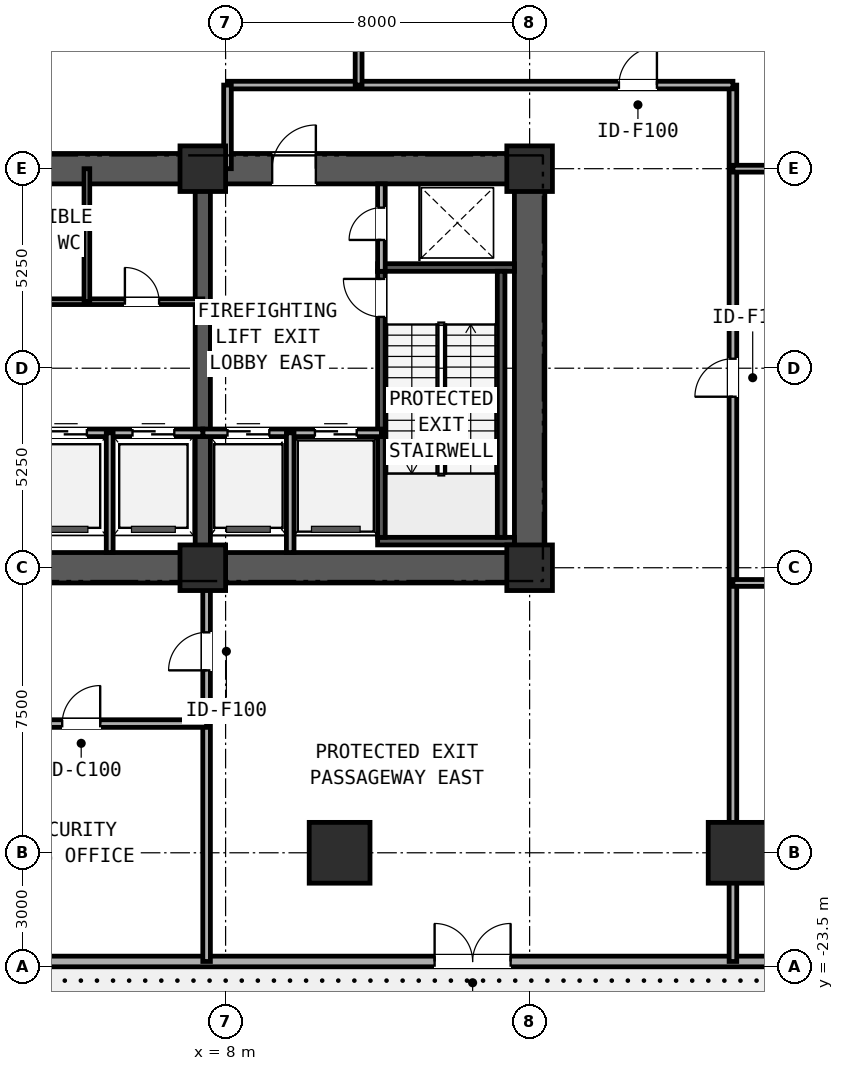
"""IFC4 building model, lengths in metres.
Left out: names, types, materials, properties, quantities, classifications, styles, units other than length and angle.
Written with IfcOpenShell. Run it as: python <this file> out.ifc"""

import sys

from ifc_helpers import new_model, si_unit, direction, frame, frame_2d, origin, origin_2d, place, context, subcontext, project, spatial, rectangle, extrude, element, fill, save


model = new_model("IFC4")
c1 = context("Model", 3, precision=1e-05, world=origin(), true_north=direction((0.0, 1.0)))
c2 = subcontext(c1, "Body", "Model", "MODEL_VIEW")
j1 = project(units=[si_unit("LENGTHUNIT", "METRE"), si_unit("PLANEANGLEUNIT", "RADIAN")], contexts=[c1])
p1 = place(None, origin())
s1 = spatial("IfcSite", under=j1, at=p1, CompositionType="ELEMENT")
p2 = place(p1, origin())
s2 = spatial("IfcBuilding", under=s1, at=p2, CompositionType="ELEMENT")
p3 = place(p2, origin())
s3 = spatial("IfcBuildingStorey", under=s2, at=p3, CompositionType="ELEMENT", Elevation=0.0)
p4 = place(p3, frame((-16.4, -13.0, 0.0), z_axis=(0.0, 0.0, 1.0), x_axis=(1.0, 0.0, 0.0)))
e1 = element("IfcWall", 1, at=p4, inside=s3, PredefinedType="SHEAR", context=c2, shape_type="SweptSolid", body=[
    extrude(rectangle(XDim=32.8, YDim=0.8, at=frame_2d((16.4, 0.0))), origin(), (0.0, 0.0, 1.0), 4.82),
])
p5 = place(p3, frame((-16.4, -2.5, 0.0), z_axis=(0.0, 0.0, 1.0), x_axis=(1.0, 0.0, 0.0)))
e2 = element("IfcWall", 2, at=p5, inside=s3, PredefinedType="SHEAR", context=c2, shape_type="SweptSolid", body=[
    extrude(rectangle(XDim=32.8, YDim=0.8, at=frame_2d((16.4, 0.0))), origin(), (0.0, 0.0, 1.0), 4.82),
])
p6 = place(p5, frame((6.025, 0.0, 0.0)))
e3 = element("IfcOpeningElement", 3, at=p6, cuts=e2, PredefinedType="OPENING", context=c2, shape_type="SweptSolid", body=[
    extrude(rectangle(XDim=1.15, YDim=2.0, at=frame_2d((0.575, 1.0))), frame((0.0, 0.41, 0.0), z_axis=(0.0, -1.0, 0.0), x_axis=(1.0, 0.0, 0.0)), (0.0, 0.0, 1.0), 0.82),
])
p7 = place(p5, frame((15.6, 0.0, 0.0)))
e4 = element("IfcOpeningElement", 4, at=p7, cuts=e2, PredefinedType="OPENING", context=c2, shape_type="SweptSolid", body=[
    extrude(rectangle(XDim=1.6, YDim=2.0, at=frame_2d((0.8, 1.0))), frame((0.0, 0.41, 0.0), z_axis=(0.0, -1.0, 0.0), x_axis=(1.0, 0.0, 0.0)), (0.0, 0.0, 1.0), 0.82),
])
p8 = place(p5, frame((25.625, 0.0, 0.0)))
e5 = element("IfcOpeningElement", 5, at=p8, cuts=e2, PredefinedType="OPENING", context=c2, shape_type="SweptSolid", body=[
    extrude(rectangle(XDim=1.15, YDim=2.0, at=frame_2d((0.575, 1.0))), frame((0.0, 0.41, 0.0), z_axis=(0.0, -1.0, 0.0), x_axis=(1.0, 0.0, 0.0)), (0.0, 0.0, 1.0), 0.82),
])
p9 = place(p3, frame((16.0, -12.6, 0.0), z_axis=(0.0, 0.0, 1.0), x_axis=(0.0, 1.0, 0.0)))
e6 = element("IfcWall", 6, at=p9, inside=s3, PredefinedType="SHEAR", context=c2, shape_type="SweptSolid", body=[
    extrude(rectangle(XDim=9.7, YDim=0.8, at=frame_2d((4.85, 0.0))), origin(), (0.0, 0.0, 1.0), 4.82),
])
p10 = place(p3, frame((7.4, -12.6, 0.0), z_axis=(0.0, 0.0, 1.0), x_axis=(0.0, 1.0, 0.0)))
e7 = element("IfcWall", 7, at=p10, inside=s3, PredefinedType="SHEAR", context=c2, shape_type="SweptSolid", body=[
    extrude(rectangle(XDim=9.7, YDim=0.4, at=frame_2d((4.85, 0.0))), origin(), (0.0, 0.0, 1.0), 5.1),
])
for number, where, z_axis, x_axis in (
    (8, (12.0, -12.3, 0.0), (0.0, 0.0, 1.0), (1.0, 0.0, 0.0)),
    (9, (12.0, -5.1, 0.0), (0.0, 0.0, 1.0), (1.0, 0.0, 0.0)),
):
    element("IfcWall", number, at=place(p3, frame(where, z_axis=z_axis, x_axis=x_axis)), inside=s3, PredefinedType="SOLIDWALL", context=c2, shape_type="SweptSolid", body=[
        extrude(rectangle(XDim=3.6, YDim=0.2, at=frame_2d((1.8, 0.0))), origin(), (0.0, 0.0, 1.0), 5.1),
    ])
p11 = place(p3, frame((12.1, -12.2, 0.0), z_axis=(0.0, 0.0, 1.0), x_axis=(0.0, 1.0, 0.0)))
e10 = element("IfcWall", 10, at=p11, inside=s3, PredefinedType="SOLIDWALL", context=c2, shape_type="SweptSolid", body=[
    extrude(rectangle(XDim=7.0, YDim=0.2, at=frame_2d((3.5, 0.0))), origin(), (0.0, 0.0, 1.0), 5.1),
])
p12 = place(p11, frame((5.8, 0.0, 0.0)))
e11 = element("IfcOpeningElement", 11, at=p12, cuts=e10, PredefinedType="OPENING", context=c2, shape_type="SweptSolid", body=[
    extrude(rectangle(XDim=1.0, YDim=2.1, at=frame_2d((0.5, 1.05))), frame((0.0, 0.11, 0.0), z_axis=(0.0, -1.0, 0.0), x_axis=(1.0, 0.0, 0.0)), (0.0, 0.0, 1.0), 0.22),
])
p13 = place(p3, frame((15.25, -12.2, 0.0), z_axis=(0.0, 0.0, 1.0), x_axis=(0.0, 1.0, 0.0)))
e12 = element("IfcWall", 12, at=p13, inside=s3, PredefinedType="SOLIDWALL", context=c2, shape_type="SweptSolid", body=[
    extrude(rectangle(XDim=7.0, YDim=0.2, at=frame_2d((3.5, 0.0))), origin(), (0.0, 0.0, 1.0), 5.1),
])
for number, where, z_axis, x_axis in (
    (13, (7.4, -13.0, 0.0), (0.0, 0.0, 1.0), (1.0, 0.0, 0.0)),
    (14, (16.0, -13.0, 0.0), (0.0, 0.0, 1.0), (1.0, 0.0, 0.0)),
    (15, (7.4, -2.5, 0.0), (0.0, 0.0, 1.0), (1.0, 0.0, 0.0)),
    (16, (16.0, -2.5, 0.0), (0.0, 0.0, 1.0), (1.0, 0.0, 0.0)),
):
    element("IfcColumn", number, at=place(p3, frame(where, z_axis=z_axis, x_axis=x_axis)), inside=s3, PredefinedType="COLUMN", context=c2, shape_type="SweptSolid", body=[
        extrude(rectangle(XDim=1.2, YDim=1.2, at=origin_2d()), origin(), (0.0, 0.0, 1.0), 5.4),
    ])
for number, where, z_axis, x_axis in (
    (17, (11.0, -20.5, 0.0), (0.0, 0.0, 1.0), (1.0, 0.0, 0.0)),
    (18, (21.5, -20.5, 0.0), (0.0, 0.0, 1.0), (1.0, 0.0, 0.0)),
):
    element("IfcColumn", number, at=place(p3, frame(where, z_axis=z_axis, x_axis=x_axis)), inside=s3, PredefinedType="COLUMN", context=c2, shape_type="SweptSolid", body=[
        extrude(rectangle(XDim=1.6, YDim=1.6, at=origin_2d()), origin(), (0.0, 0.0, 1.0), 5.4),
    ])
p14 = place(p3, frame((-32.4, -23.36, 0.0), z_axis=(0.0, 0.0, 1.0), x_axis=(1.0, 0.0, 0.0)))
e19 = element("IfcWall", 19, at=p14, inside=s3, PredefinedType="STANDARD", context=c2, shape_type="SweptSolid", body=[
    extrude(rectangle(XDim=64.8, YDim=0.28, at=frame_2d((32.4, 0.0))), origin(), (0.0, 0.0, 1.0), 5.1),
])
p15 = place(p14, frame((16.9, 0.0, 0.0)))
e20 = element("IfcOpeningElement", 20, at=p15, cuts=e19, PredefinedType="OPENING", context=c2, shape_type="SweptSolid", body=[
    extrude(rectangle(XDim=2.0, YDim=2.35, at=frame_2d((1.0, 1.175))), frame((0.0, 0.15, 0.0), z_axis=(0.0, -1.0, 0.0), x_axis=(1.0, 0.0, 0.0)), (0.0, 0.0, 1.0), 0.3),
])
p16 = place(p14, frame((45.9, 0.0, 0.0)))
e21 = element("IfcOpeningElement", 21, at=p16, cuts=e19, PredefinedType="OPENING", context=c2, shape_type="SweptSolid", body=[
    extrude(rectangle(XDim=2.0, YDim=2.35, at=frame_2d((1.0, 1.175))), frame((0.0, 0.15, 0.0), z_axis=(0.0, -1.0, 0.0), x_axis=(1.0, 0.0, 0.0)), (0.0, 0.0, 1.0), 0.3),
])
p17 = place(p3, frame((12.1, -5.2, 0.0), z_axis=(0.0, 0.0, 1.0), x_axis=(0.0, 1.0, 0.0)))
e22 = element("IfcWall", 22, at=p17, inside=s3, PredefinedType="PARTITIONING", context=c2, shape_type="SweptSolid", body=[
    extrude(rectangle(XDim=2.3, YDim=0.2, at=frame_2d((1.15, 0.0))), origin(), (0.0, 0.0, 1.0), 5.1),
])
p18 = place(p17, frame((0.825, 0.0, 0.0)))
e23 = element("IfcOpeningElement", 23, at=p18, cuts=e22, PredefinedType="OPENING", context=c2, shape_type="SweptSolid", body=[
    extrude(rectangle(XDim=0.85, YDim=2.05, at=frame_2d((0.425, 1.025))), frame((0.0, 0.11, 0.0), z_axis=(0.0, -1.0, 0.0), x_axis=(1.0, 0.0, 0.0)), (0.0, 0.0, 1.0), 0.22),
])
p19 = place(p3, frame((7.4, -9.45, 0.0), z_axis=(0.0, 0.0, 1.0), x_axis=(1.0, 0.0, 0.0)))
e24 = element("IfcWall", 24, at=p19, inside=s3, PredefinedType="PARTITIONING", context=c2, shape_type="SweptSolid", body=[
    extrude(rectangle(XDim=4.7, YDim=0.2, at=frame_2d((2.35, 0.0))), origin(), (0.0, 0.0, 1.0), 5.1),
])
p20 = place(p19, frame((2.95, 0.0, 0.0)))
e25 = element("IfcOpeningElement", 25, at=p20, cuts=e24, PredefinedType="OPENING", context=c2, shape_type="SweptSolid", body=[
    extrude(rectangle(XDim=1.1, YDim=2.2, at=frame_2d((0.55, 1.1))), frame((0.0, 0.11, 0.0), z_axis=(0.0, -1.0, 0.0), x_axis=(1.0, 0.0, 0.0)), (0.0, 0.0, 1.0), 0.22),
])
p21 = place(p19, frame((0.65, 0.0, 0.0)))
e26 = element("IfcOpeningElement", 26, at=p21, cuts=e24, PredefinedType="OPENING", context=c2, shape_type="SweptSolid", body=[
    extrude(rectangle(XDim=1.1, YDim=2.2, at=frame_2d((0.55, 1.1))), frame((0.0, 0.11, 0.0), z_axis=(0.0, -1.0, 0.0), x_axis=(1.0, 0.0, 0.0)), (0.0, 0.0, 1.0), 0.22),
])
p22 = place(p3, frame((9.7, -12.6, 0.0), z_axis=(0.0, 0.0, 1.0), x_axis=(0.0, 1.0, 0.0)))
e27 = element("IfcWall", 27, at=p22, inside=s3, PredefinedType="PARTITIONING", context=c2, shape_type="SweptSolid", body=[
    extrude(rectangle(XDim=3.15, YDim=0.2, at=frame_2d((1.575, 0.0))), origin(), (0.0, 0.0, 1.0), 5.1),
])
p23 = place(p3, frame((2.55, -9.45, 0.0), z_axis=(0.0, 0.0, 1.0), x_axis=(1.0, 0.0, 0.0)))
e28 = element("IfcWall", 28, at=p23, inside=s3, PredefinedType="PARTITIONING", context=c2, shape_type="SweptSolid", body=[
    extrude(rectangle(XDim=4.85, YDim=0.2, at=frame_2d((2.425, 0.0))), origin(), (0.0, 0.0, 1.0), 5.1),
])
p24 = place(p23, frame((0.7, 0.0, 0.0)))
e29 = element("IfcOpeningElement", 29, at=p24, cuts=e28, PredefinedType="OPENING", context=c2, shape_type="SweptSolid", body=[
    extrude(rectangle(XDim=1.1, YDim=2.2, at=frame_2d((0.55, 1.1))), frame((0.0, 0.11, 0.0), z_axis=(0.0, -1.0, 0.0), x_axis=(1.0, 0.0, 0.0)), (0.0, 0.0, 1.0), 0.22),
])
p25 = place(p23, frame((3.0, 0.0, 0.0)))
e30 = element("IfcOpeningElement", 30, at=p25, cuts=e28, PredefinedType="OPENING", context=c2, shape_type="SweptSolid", body=[
    extrude(rectangle(XDim=1.1, YDim=2.2, at=frame_2d((0.55, 1.1))), frame((0.0, 0.11, 0.0), z_axis=(0.0, -1.0, 0.0), x_axis=(1.0, 0.0, 0.0)), (0.0, 0.0, 1.0), 0.22),
])
p26 = place(p3, frame((4.95, -12.6, 0.0), z_axis=(0.0, 0.0, 1.0), x_axis=(0.0, 1.0, 0.0)))
e31 = element("IfcWall", 31, at=p26, inside=s3, PredefinedType="PARTITIONING", context=c2, shape_type="SweptSolid", body=[
    extrude(rectangle(XDim=3.15, YDim=0.18, at=frame_2d((1.575, 0.0))), origin(), (0.0, 0.0, 1.0), 5.1),
])
p27 = place(p3, frame((1.6, -6.0, 0.0), z_axis=(0.0, 0.0, 1.0), x_axis=(1.0, 0.0, 0.0)))
e32 = element("IfcWall", 32, at=p27, inside=s3, PredefinedType="PARTITIONING", context=c2, shape_type="SweptSolid", body=[
    extrude(rectangle(XDim=5.8, YDim=0.15, at=frame_2d((2.9, 0.0))), origin(), (0.0, 0.0, 1.0), 5.1),
])
p28 = place(p27, frame((0.9, 0.0, 0.0)))
e33 = element("IfcOpeningElement", 33, at=p28, cuts=e32, PredefinedType="OPENING", context=c2, shape_type="SweptSolid", body=[
    extrude(rectangle(XDim=0.9, YDim=2.1, at=frame_2d((0.45, 1.05))), frame((0.0, 0.085, 0.0), z_axis=(0.0, -1.0, 0.0), x_axis=(1.0, 0.0, 0.0)), (0.0, 0.0, 1.0), 0.17),
])
p29 = place(p27, frame((3.75, 0.0, 0.0)))
e34 = element("IfcOpeningElement", 34, at=p29, cuts=e32, PredefinedType="OPENING", context=c2, shape_type="SweptSolid", body=[
    extrude(rectangle(XDim=0.9, YDim=2.1, at=frame_2d((0.45, 1.05))), frame((0.0, 0.085, 0.0), z_axis=(0.0, -1.0, 0.0), x_axis=(1.0, 0.0, 0.0)), (0.0, 0.0, 1.0), 0.17),
])
p30 = place(p3, frame((4.35, -6.0, 0.0), z_axis=(0.0, 0.0, 1.0), x_axis=(0.0, 1.0, 0.0)))
e35 = element("IfcWall", 35, at=p30, inside=s3, PredefinedType="PARTITIONING", context=c2, shape_type="SweptSolid", body=[
    extrude(rectangle(XDim=3.5, YDim=0.15, at=frame_2d((1.75, 0.0))), origin(), (0.0, 0.0, 1.0), 4.229),
])
p31 = place(p3, frame((21.35, -23.36, 0.0), z_axis=(0.0, 0.0, 1.0), x_axis=(0.0, 1.0, 0.0)))
e36 = element("IfcWall", 36, at=p31, inside=s3, PredefinedType="PARTITIONING", context=c2, shape_type="SweptSolid", body=[
    extrude(rectangle(XDim=23.06, YDim=0.2, at=frame_2d((11.53, 0.0))), origin(), (0.0, 0.0, 1.0), 4.229),
])
p32 = place(p31, frame((14.86, 0.0, 0.0)))
e37 = element("IfcOpeningElement", 37, at=p32, cuts=e36, PredefinedType="OPENING", context=c2, shape_type="SweptSolid", body=[
    extrude(rectangle(XDim=1.0, YDim=2.1, at=frame_2d((0.5, 1.05))), frame((0.0, 0.11, 0.0), z_axis=(0.0, -1.0, 0.0), x_axis=(1.0, 0.0, 0.0)), (0.0, 0.0, 1.0), 0.22),
])
p33 = place(p3, frame((8.05, -0.3, 0.0), z_axis=(0.0, 0.0, 1.0), x_axis=(1.0, 0.0, 0.0)))
e38 = element("IfcWall", 38, at=p33, inside=s3, PredefinedType="PARTITIONING", context=c2, shape_type="SweptSolid", body=[
    extrude(rectangle(XDim=13.3, YDim=0.2, at=frame_2d((6.65, 0.0))), origin(), (0.0, 0.0, 1.0), 4.229),
])
p34 = place(p33, frame((10.3, 0.0, 0.0)))
e39 = element("IfcOpeningElement", 39, at=p34, cuts=e38, PredefinedType="OPENING", context=c2, shape_type="SweptSolid", body=[
    extrude(rectangle(XDim=1.0, YDim=2.1, at=frame_2d((0.5, 1.05))), frame((0.0, 0.11, 0.0), z_axis=(0.0, -1.0, 0.0), x_axis=(1.0, 0.0, 0.0)), (0.0, 0.0, 1.0), 0.22),
])
p35 = place(p3, frame((8.05, -2.5, 0.0), z_axis=(0.0, 0.0, 1.0), x_axis=(0.0, 1.0, 0.0)))
e40 = element("IfcWall", 40, at=p35, inside=s3, PredefinedType="PARTITIONING", context=c2, shape_type="SweptSolid", body=[
    extrude(rectangle(XDim=2.2, YDim=0.2, at=frame_2d((1.1, 0.0))), origin(), (0.0, 0.0, 1.0), 4.312),
])
p36 = place(p3, frame((7.5, -23.36, 0.0), z_axis=(0.0, 0.0, 1.0), x_axis=(0.0, 1.0, 0.0)))
e41 = element("IfcWall", 41, at=p36, inside=s3, PredefinedType="PARTITIONING", context=c2, shape_type="SweptSolid", body=[
    extrude(rectangle(XDim=10.01, YDim=0.2, at=frame_2d((5.005, 0.0))), origin(), (0.0, 0.0, 1.0), 4.229),
])
p37 = place(p36, frame((7.66, 0.0, 0.0)))
e42 = element("IfcOpeningElement", 42, at=p37, cuts=e41, PredefinedType="OPENING", context=c2, shape_type="SweptSolid", body=[
    extrude(rectangle(XDim=1.0, YDim=2.1, at=frame_2d((0.5, 1.05))), frame((0.0, 0.11, 0.0), z_axis=(0.0, -1.0, 0.0), x_axis=(1.0, 0.0, 0.0)), (0.0, 0.0, 1.0), 0.22),
])
p38 = place(p3, frame((-7.5, -17.1, 0.0), z_axis=(0.0, 0.0, 1.0), x_axis=(1.0, 0.0, 0.0)))
e43 = element("IfcWall", 43, at=p38, inside=s3, PredefinedType="PARTITIONING", context=c2, shape_type="SweptSolid", body=[
    extrude(rectangle(XDim=15.0, YDim=0.2, at=frame_2d((7.5, 0.0))), origin(), (0.0, 0.0, 1.0), 4.229),
])
p39 = place(p38, frame((2.8, 0.0, 0.0)))
e44 = element("IfcOpeningElement", 44, at=p39, cuts=e43, PredefinedType="OPENING", context=c2, shape_type="SweptSolid", body=[
    extrude(rectangle(XDim=1.0, YDim=2.1, at=frame_2d((0.5, 1.05))), frame((0.0, 0.11, 0.0), z_axis=(0.0, -1.0, 0.0), x_axis=(1.0, 0.0, 0.0)), (0.0, 0.0, 1.0), 0.22),
])
p40 = place(p38, frame((11.2, 0.0, 0.0)))
e45 = element("IfcOpeningElement", 45, at=p40, cuts=e43, PredefinedType="OPENING", context=c2, shape_type="SweptSolid", body=[
    extrude(rectangle(XDim=1.0, YDim=2.15, at=frame_2d((0.5, 1.075))), frame((0.0, 0.11, 0.0), z_axis=(0.0, -1.0, 0.0), x_axis=(1.0, 0.0, 0.0)), (0.0, 0.0, 1.0), 0.22),
])
p41 = place(p3, frame((11.5, -0.3, 0.0), z_axis=(0.0, 0.0, 1.0), x_axis=(0.0, 1.0, 0.0)))
e46 = element("IfcWall", 46, at=p41, inside=s3, PredefinedType="PARTITIONING", context=c2, shape_type="SweptSolid", body=[
    extrude(rectangle(XDim=17.5, YDim=0.18, at=frame_2d((8.75, 0.0))), origin(), (0.0, 0.0, 1.0), 4.229),
])
p42 = place(p41, frame((3.5, 0.0, 0.0)))
e47 = element("IfcOpeningElement", 47, at=p42, cuts=e46, PredefinedType="OPENING", context=c2, shape_type="SweptSolid", body=[
    extrude(rectangle(XDim=1.6, YDim=2.2, at=frame_2d((0.8, 1.1))), frame((0.0, 0.1, 0.0), z_axis=(0.0, -1.0, 0.0), x_axis=(1.0, 0.0, 0.0)), (0.0, 0.0, 1.0), 0.2),
])
p43 = place(p3, frame((21.35, -2.5, 0.0), z_axis=(0.0, 0.0, 1.0), x_axis=(1.0, 0.0, 0.0)))
e48 = element("IfcWall", 48, at=p43, inside=s3, PredefinedType="PARTITIONING", context=c2, shape_type="SweptSolid", body=[
    extrude(rectangle(XDim=12.51, YDim=0.18, at=frame_2d((6.255, 0.0))), origin(), (0.0, 0.0, 1.0), 4.229),
])
p44 = place(p43, frame((3.55, 0.0, 0.0)))
e49 = element("IfcOpeningElement", 49, at=p44, cuts=e48, PredefinedType="OPENING", context=c2, shape_type="SweptSolid", body=[
    extrude(rectangle(XDim=1.2, YDim=2.2, at=frame_2d((0.6, 1.1))), frame((0.0, 0.1, 0.0), z_axis=(0.0, -1.0, 0.0), x_axis=(1.0, 0.0, 0.0)), (0.0, 0.0, 1.0), 0.2),
])
p45 = place(p3, frame((21.35, -13.4, 0.0), z_axis=(0.0, 0.0, 1.0), x_axis=(1.0, 0.0, 0.0)))
e50 = element("IfcWall", 50, at=p45, inside=s3, PredefinedType="PARTITIONING", context=c2, shape_type="SweptSolid", body=[
    extrude(rectangle(XDim=12.51, YDim=0.18, at=frame_2d((6.255, 0.0))), origin(), (0.0, 0.0, 1.0), 4.229),
])
p46 = place(p45, frame((4.45, 0.0, 0.0)))
e51 = element("IfcOpeningElement", 51, at=p46, cuts=e50, PredefinedType="OPENING", context=c2, shape_type="SweptSolid", body=[
    extrude(rectangle(XDim=1.4, YDim=2.2, at=frame_2d((0.7, 1.1))), frame((0.0, 0.1, 0.0), z_axis=(0.0, -1.0, 0.0), x_axis=(1.0, 0.0, 0.0)), (0.0, 0.0, 1.0), 0.2),
])
p47 = place(p16, frame((2.0, 0.0, 0.0), z_axis=(0.0, 0.0, 1.0), x_axis=(-1.0, 0.0, 0.0)))
e52 = element("IfcDoor", 52, at=p47, inside=s3, OperationType="DOUBLE_DOOR_SINGLE_SWING", PredefinedType="DOOR", context=c2, shape_type="SweptSolid", body=[
    extrude(rectangle(XDim=2.0, YDim=2.35, at=frame_2d((1.0, 1.175))), frame((0.0, 0.025, 0.0), z_axis=(0.0, -1.0, 0.0), x_axis=(1.0, 0.0, 0.0)), (0.0, 0.0, 1.0), 0.05),
])
fill(e21, e52)
p48 = place(p12, origin())
e53 = element("IfcDoor", 53, at=p48, inside=s3, OperationType="SINGLE_SWING_RIGHT", PredefinedType="DOOR", context=c2, shape_type="SweptSolid", body=[
    extrude(rectangle(XDim=1.0, YDim=2.1, at=frame_2d((0.5, 1.05))), frame((0.0, 0.025, 0.0), z_axis=(0.0, -1.0, 0.0), x_axis=(1.0, 0.0, 0.0)), (0.0, 0.0, 1.0), 0.05),
])
fill(e11, e53)
p49 = place(p18, frame((0.85, 0.0, 0.0), z_axis=(0.0, 0.0, 1.0), x_axis=(-1.0, 0.0, 0.0)))
e54 = element("IfcDoor", 54, at=p49, inside=s3, OperationType="SINGLE_SWING_LEFT", PredefinedType="DOOR", context=c2, shape_type="SweptSolid", body=[
    extrude(rectangle(XDim=0.85, YDim=2.05, at=frame_2d((0.425, 1.025))), frame((0.0, 0.025, 0.0), z_axis=(0.0, -1.0, 0.0), x_axis=(1.0, 0.0, 0.0)), (0.0, 0.0, 1.0), 0.05),
])
fill(e23, e54)
p50 = place(p20, origin())
e55 = element("IfcDoor", 55, at=p50, inside=s3, OperationType="SLIDING_TO_LEFT", PredefinedType="DOOR", context=c2, shape_type="SweptSolid", body=[
    extrude(rectangle(XDim=1.1, YDim=2.2, at=frame_2d((0.55, 1.1))), frame((0.0, 0.025, 0.0), z_axis=(0.0, -1.0, 0.0), x_axis=(1.0, 0.0, 0.0)), (0.0, 0.0, 1.0), 0.05),
])
fill(e25, e55)
p51 = place(p21, origin())
e56 = element("IfcDoor", 56, at=p51, inside=s3, OperationType="SLIDING_TO_RIGHT", PredefinedType="DOOR", context=c2, shape_type="SweptSolid", body=[
    extrude(rectangle(XDim=1.1, YDim=2.2, at=frame_2d((0.55, 1.1))), frame((0.0, 0.025, 0.0), z_axis=(0.0, -1.0, 0.0), x_axis=(1.0, 0.0, 0.0)), (0.0, 0.0, 1.0), 0.05),
])
fill(e26, e56)
p52 = place(p8, origin())
e57 = element("IfcDoor", 57, at=p52, inside=s3, OperationType="SINGLE_SWING_RIGHT", PredefinedType="DOOR", context=c2, shape_type="SweptSolid", body=[
    extrude(rectangle(XDim=1.15, YDim=2.0, at=frame_2d((0.575, 1.0))), frame((0.0, 0.025, 0.0), z_axis=(0.0, -1.0, 0.0), x_axis=(1.0, 0.0, 0.0)), (0.0, 0.0, 1.0), 0.05),
])
fill(e5, e57)
p53 = place(p24, origin())
e58 = element("IfcDoor", 58, at=p53, inside=s3, OperationType="SLIDING_TO_LEFT", PredefinedType="DOOR", context=c2, shape_type="SweptSolid", body=[
    extrude(rectangle(XDim=1.1, YDim=2.2, at=frame_2d((0.55, 1.1))), frame((0.0, 0.025, 0.0), z_axis=(0.0, -1.0, 0.0), x_axis=(1.0, 0.0, 0.0)), (0.0, 0.0, 1.0), 0.05),
])
fill(e29, e58)
p54 = place(p25, origin())
e59 = element("IfcDoor", 59, at=p54, inside=s3, OperationType="SLIDING_TO_LEFT", PredefinedType="DOOR", context=c2, shape_type="SweptSolid", body=[
    extrude(rectangle(XDim=1.1, YDim=2.2, at=frame_2d((0.55, 1.1))), frame((0.0, 0.025, 0.0), z_axis=(0.0, -1.0, 0.0), x_axis=(1.0, 0.0, 0.0)), (0.0, 0.0, 1.0), 0.05),
])
fill(e30, e59)
p55 = place(p29, frame((0.9, 0.0, 0.0), z_axis=(0.0, 0.0, 1.0), x_axis=(-1.0, 0.0, 0.0)))
e60 = element("IfcDoor", 60, at=p55, inside=s3, OperationType="SINGLE_SWING_LEFT", PredefinedType="DOOR", context=c2, shape_type="SweptSolid", body=[
    extrude(rectangle(XDim=0.9, YDim=2.1, at=frame_2d((0.45, 1.05))), frame((0.0, 0.025, 0.0), z_axis=(0.0, -1.0, 0.0), x_axis=(1.0, 0.0, 0.0)), (0.0, 0.0, 1.0), 0.05),
])
fill(e34, e60)
p56 = place(p34, frame((1.0, 0.0, 0.0), z_axis=(0.0, 0.0, 1.0), x_axis=(-1.0, 0.0, 0.0)))
e61 = element("IfcDoor", 61, at=p56, inside=s3, OperationType="SINGLE_SWING_RIGHT", PredefinedType="DOOR", context=c2, shape_type="SweptSolid", body=[
    extrude(rectangle(XDim=1.0, YDim=2.1, at=frame_2d((0.5, 1.05))), frame((0.0, 0.025, 0.0), z_axis=(0.0, -1.0, 0.0), x_axis=(1.0, 0.0, 0.0)), (0.0, 0.0, 1.0), 0.05),
])
fill(e39, e61)
p57 = place(p40, origin())
e62 = element("IfcDoor", 62, at=p57, inside=s3, OperationType="SINGLE_SWING_RIGHT", PredefinedType="DOOR", context=c2, shape_type="SweptSolid", body=[
    extrude(rectangle(XDim=1.0, YDim=2.15, at=frame_2d((0.5, 1.075))), frame((0.0, 0.025, 0.0), z_axis=(0.0, -1.0, 0.0), x_axis=(1.0, 0.0, 0.0)), (0.0, 0.0, 1.0), 0.05),
])
fill(e45, e62)
p58 = place(p37, frame((1.0, 0.0, 0.0), z_axis=(0.0, 0.0, 1.0), x_axis=(-1.0, 0.0, 0.0)))
e63 = element("IfcDoor", 63, at=p58, inside=s3, OperationType="SINGLE_SWING_LEFT", PredefinedType="DOOR", context=c2, shape_type="SweptSolid", body=[
    extrude(rectangle(XDim=1.0, YDim=2.1, at=frame_2d((0.5, 1.05))), frame((0.0, 0.025, 0.0), z_axis=(0.0, -1.0, 0.0), x_axis=(1.0, 0.0, 0.0)), (0.0, 0.0, 1.0), 0.05),
])
fill(e42, e63)
p59 = place(p32, frame((1.0, 0.0, 0.0), z_axis=(0.0, 0.0, 1.0), x_axis=(-1.0, 0.0, 0.0)))
e64 = element("IfcDoor", 64, at=p59, inside=s3, OperationType="SINGLE_SWING_LEFT", PredefinedType="DOOR", context=c2, shape_type="SweptSolid", body=[
    extrude(rectangle(XDim=1.0, YDim=2.1, at=frame_2d((0.5, 1.05))), frame((0.0, 0.025, 0.0), z_axis=(0.0, -1.0, 0.0), x_axis=(1.0, 0.0, 0.0)), (0.0, 0.0, 1.0), 0.05),
])
fill(e37, e64)
save(model, sys.argv[1])
